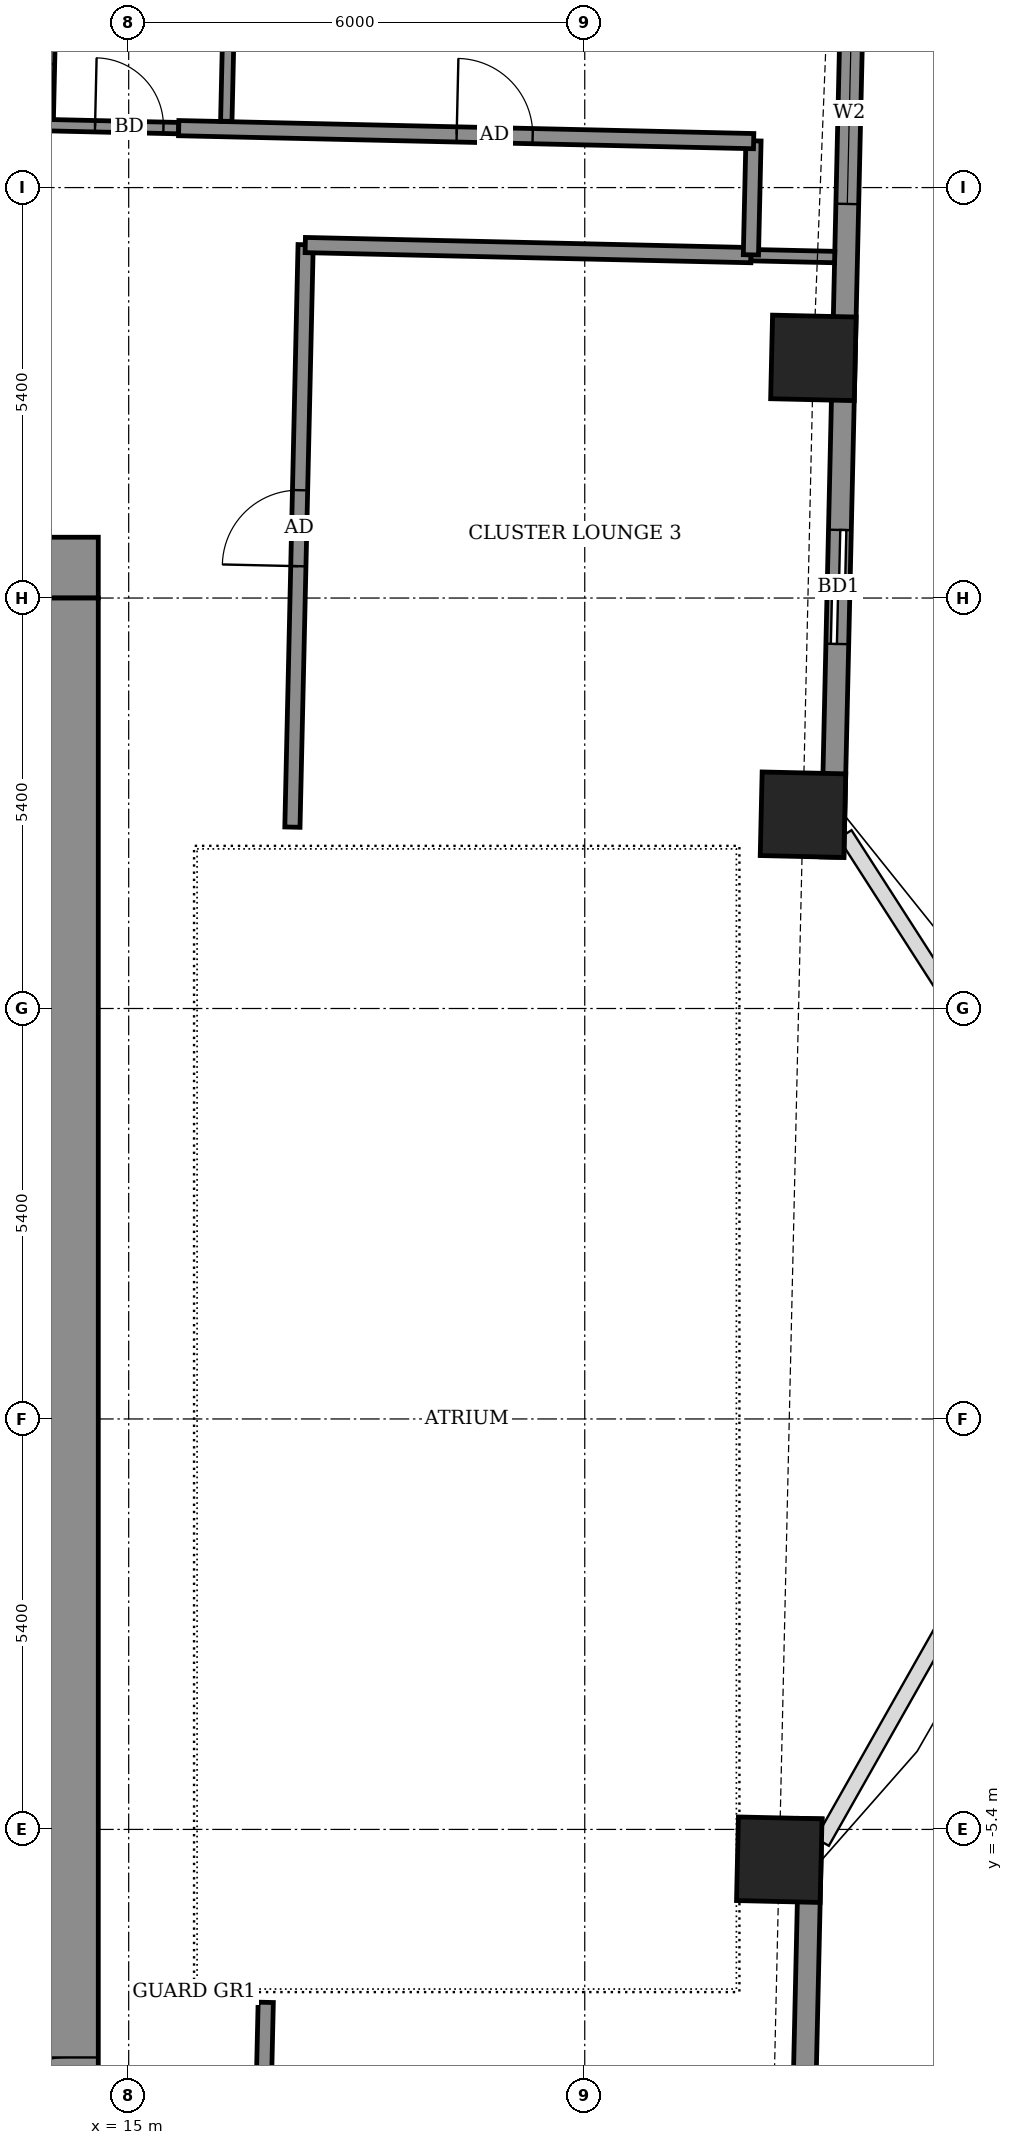
"""IFC4 building model, lengths in metres.
Left out: names, types, materials, properties, quantities, classifications, styles, units other than length and angle.
Written with IfcOpenShell. Run it as: python <this file> out.ifc"""

import sys

from ifc_helpers import new_model, si_unit, direction, frame, frame_2d, origin, origin_2d, place, context, subcontext, project, spatial, rectangle, extrude, element, fill, save


model = new_model("IFC4")
c1 = context("Model", 3, precision=1e-05, world=origin(), true_north=direction((0.0, 1.0)))
c2 = subcontext(c1, "Body", "Model", "MODEL_VIEW")
j1 = project(units=[si_unit("LENGTHUNIT", "METRE"), si_unit("PLANEANGLEUNIT", "RADIAN")], contexts=[c1])
p1 = place(None, origin())
s1 = spatial("IfcSite", under=j1, at=p1, CompositionType="ELEMENT")
p2 = place(p1, origin())
s2 = spatial("IfcBuilding", under=s1, at=p2, CompositionType="ELEMENT")
p3 = place(p2, frame((0.0, 0.0, 208.7)))
s3 = spatial("IfcBuildingStorey", under=s2, at=p3, CompositionType="ELEMENT", Elevation=208.7)
for number, where, z_axis, x_axis in (
    (1, (23.559, -5.799, -0.55), (0.0, 0.0, 1.0), (0.023, 1.0, 0.0)),
    (2, (23.871, 7.949, -0.55), (0.0, 0.0, 1.0), (0.023, 1.0, 0.0)),
    (3, (24.008, 13.959, -0.55), (0.0, 0.0, 1.0), (0.023, 1.0, 0.0)),
):
    element("IfcColumn", number, at=place(p3, frame(where, z_axis=z_axis, x_axis=x_axis)), inside=s3, PredefinedType="COLUMN", context=c2, shape_type="SweptSolid", body=[
        extrude(rectangle(XDim=1.1, YDim=1.1, at=origin_2d()), origin(), (0.0, 0.0, 1.0), 3.6),
    ])
p4 = place(p3, frame((23.713, -16.679, 0.0), z_axis=(0.0, 0.0, 1.0), x_axis=(0.022674801414, 0.999742893639, 0.0)))
e4 = element("IfcWall", 4, at=p4, inside=s3, PredefinedType="SOLIDWALL", context=c2, shape_type="SweptSolid", body=[
    extrude(rectangle(XDim=11.424, YDim=0.3, at=frame_2d((5.712, 0.0))), origin(), (0.0, 0.0, 1.0), 2.55),
])
p5 = place(p4, frame((1.428, 0.0, 0.0)))
e5 = element("IfcOpeningElement", 5, at=p5, cuts=e4, PredefinedType="OPENING", context=c2, shape_type="SweptSolid", body=[
    extrude(rectangle(XDim=1.5, YDim=2.4, at=frame_2d((0.75, 1.2))), frame((0.0, 0.16, 0.0), z_axis=(0.0, -1.0, 0.0), x_axis=(1.0, 0.0, 0.0)), (0.0, 0.0, 1.0), 0.32),
])
p6 = place(p4, frame((6.577, 0.0, 0.9)))
e6 = element("IfcOpeningElement", 6, at=p6, cuts=e4, PredefinedType="OPENING", context=c2, shape_type="SweptSolid", body=[
    extrude(rectangle(XDim=1.2, YDim=1.5, at=frame_2d((0.6, 0.75))), frame((0.0, 0.16, 0.0), z_axis=(0.0, -1.0, 0.0), x_axis=(1.0, 0.0, 0.0)), (0.0, 0.0, 1.0), 0.32),
])
p7 = place(p3, frame((24.259, 7.391, 0.0), z_axis=(0.0, 0.0, 1.0), x_axis=(0.022696408441, 0.999742403344, 0.0)))
e7 = element("IfcWall", 7, at=p7, inside=s3, PredefinedType="SOLIDWALL", context=c2, shape_type="SweptSolid", body=[
    extrude(rectangle(XDim=12.424, YDim=0.3, at=frame_2d((6.212, 0.0))), origin(), (0.0, 0.0, 1.0), 2.55),
])
p8 = place(p7, frame((2.806, 0.0, 0.0)))
e8 = element("IfcOpeningElement", 8, at=p8, cuts=e7, PredefinedType="OPENING", context=c2, shape_type="SweptSolid", body=[
    extrude(rectangle(XDim=1.5, YDim=2.4, at=frame_2d((0.75, 1.2))), frame((0.0, 0.16, 0.0), z_axis=(0.0, -1.0, 0.0), x_axis=(1.0, 0.0, 0.0)), (0.0, 0.0, 1.0), 0.32),
])
p9 = place(p7, frame((8.596, 0.0, 0.9)))
e9 = element("IfcOpeningElement", 9, at=p9, cuts=e7, PredefinedType="OPENING", context=c2, shape_type="SweptSolid", body=[
    extrude(rectangle(XDim=2.4, YDim=1.5, at=frame_2d((1.2, 0.75))), frame((0.0, 0.16, 0.0), z_axis=(0.0, -1.0, 0.0), x_axis=(1.0, 0.0, 0.0)), (0.0, 0.0, 1.0), 0.32),
])
p10 = place(p3, frame((16.684, -12.919, 0.0), z_axis=(0.0, 0.0, 1.0), x_axis=(0.022667483124, 0.999743059595, 0.0)))
e10 = element("IfcWall", 10, at=p10, inside=s3, PredefinedType="PARTITIONING", context=c2, shape_type="SweptSolid", body=[
    extrude(rectangle(XDim=5.245, YDim=0.2, at=frame_2d((2.623, 0.0))), origin(), (0.0, 0.0, 1.0), 3.05),
])
p11 = place(p3, frame((17.154, 7.786, 0.0), z_axis=(0.0, 0.0, 1.0), x_axis=(0.022680883318, 0.999742755679, 0.0)))
e11 = element("IfcWall", 11, at=p11, inside=s3, PredefinedType="PARTITIONING", context=c2, shape_type="SweptSolid", body=[
    extrude(rectangle(XDim=7.664, YDim=0.2, at=frame_2d((3.832, 0.0))), origin(), (0.0, 0.0, 1.0), 3.05),
])
p12 = place(p11, frame((3.434, 0.0, 0.0)))
e12 = element("IfcOpeningElement", 12, at=p12, cuts=e11, PredefinedType="OPENING", context=c2, shape_type="SweptSolid", body=[
    extrude(rectangle(XDim=1.0, YDim=2.1, at=frame_2d((0.5, 1.05))), frame((0.0, 0.11, 0.0), z_axis=(0.0, -1.0, 0.0), x_axis=(1.0, 0.0, 0.0)), (0.0, 0.0, 1.0), 0.22),
])
p13 = place(p3, frame((17.323, 15.444, 0.0), z_axis=(0.0, 0.0, 1.0), x_axis=(0.999742758565, -0.022680756085, 0.0)))
e13 = element("IfcWall", 13, at=p13, inside=s3, PredefinedType="PARTITIONING", context=c2, shape_type="SweptSolid", body=[
    extrude(rectangle(XDim=5.866, YDim=0.2, at=frame_2d((2.933, 0.0))), origin(), (0.0, 0.0, 1.0), 3.05),
])
p14 = place(p3, frame((23.188, 15.311, 0.0), z_axis=(0.0, 0.0, 1.0), x_axis=(0.999738848859, -0.022852441507, 0.0)))
e14 = element("IfcWall", 14, at=p14, inside=s3, PredefinedType="PARTITIONING", context=c2, shape_type="SweptSolid", body=[
    extrude(rectangle(XDim=1.1, YDim=0.15, at=frame_2d((0.55, 0.0))), origin(), (0.0, 0.0, 1.0), 2.55),
])
p15 = place(p3, frame((23.186, 15.315, 0.0), z_axis=(0.0, 0.0, 1.0), x_axis=(0.022617910375, 0.999744182344, 0.0)))
e15 = element("IfcWall", 15, at=p15, inside=s3, PredefinedType="PARTITIONING", context=c2, shape_type="SweptSolid", body=[
    extrude(rectangle(XDim=1.5, YDim=0.2, at=frame_2d((0.75, 0.0))), origin(), (0.0, 0.0, 1.0), 3.05),
])
p16 = place(p3, frame((-14.871, 17.675, 0.0), z_axis=(0.0, 0.0, 1.0), x_axis=(0.999742359486, -0.02269834024, 0.0)))
e16 = element("IfcWall", 16, at=p16, inside=s3, PredefinedType="PARTITIONING", context=c2, shape_type="SweptSolid", body=[
    extrude(rectangle(XDim=30.536, YDim=0.15, at=frame_2d((15.268, 0.0))), origin(), (0.0, 0.0, 1.0), 3.05),
])
p17 = place(p16, frame((29.436, 0.0, 0.0)))
e17 = element("IfcOpeningElement", 17, at=p17, cuts=e16, PredefinedType="OPENING", context=c2, shape_type="SweptSolid", body=[
    extrude(rectangle(XDim=0.9, YDim=2.1, at=frame_2d((0.45, 1.05))), frame((0.0, 0.085, 0.0), z_axis=(0.0, -1.0, 0.0), x_axis=(1.0, 0.0, 0.0)), (0.0, 0.0, 1.0), 0.17),
])
p18 = place(p16, frame((22.484, 0.0, 0.0)))
e18 = element("IfcOpeningElement", 18, at=p18, cuts=e16, PredefinedType="OPENING", context=c2, shape_type="SweptSolid", body=[
    extrude(rectangle(XDim=0.9, YDim=2.1, at=frame_2d((0.45, 1.05))), frame((0.0, 0.085, 0.0), z_axis=(0.0, -1.0, 0.0), x_axis=(1.0, 0.0, 0.0)), (0.0, 0.0, 1.0), 0.17),
])
p19 = place(p16, frame((20.434, 0.0, 0.0)))
e19 = element("IfcOpeningElement", 19, at=p19, cuts=e16, PredefinedType="OPENING", context=c2, shape_type="SweptSolid", body=[
    extrude(rectangle(XDim=0.9, YDim=2.1, at=frame_2d((0.45, 1.05))), frame((0.0, 0.085, 0.0), z_axis=(0.0, -1.0, 0.0), x_axis=(1.0, 0.0, 0.0)), (0.0, 0.0, 1.0), 0.17),
])
p20 = place(p16, frame((13.484, 0.0, 0.0)))
e20 = element("IfcOpeningElement", 20, at=p20, cuts=e16, PredefinedType="OPENING", context=c2, shape_type="SweptSolid", body=[
    extrude(rectangle(XDim=0.9, YDim=2.1, at=frame_2d((0.45, 1.05))), frame((0.0, 0.085, 0.0), z_axis=(0.0, -1.0, 0.0), x_axis=(1.0, 0.0, 0.0)), (0.0, 0.0, 1.0), 0.17),
])
p21 = place(p16, frame((11.334, 0.0, 0.0)))
e21 = element("IfcOpeningElement", 21, at=p21, cuts=e16, PredefinedType="OPENING", context=c2, shape_type="SweptSolid", body=[
    extrude(rectangle(XDim=0.9, YDim=2.1, at=frame_2d((0.45, 1.05))), frame((0.0, 0.085, 0.0), z_axis=(0.0, -1.0, 0.0), x_axis=(1.0, 0.0, 0.0)), (0.0, 0.0, 1.0), 0.17),
])
p22 = place(p16, frame((4.359, 0.0, 0.0)))
e22 = element("IfcOpeningElement", 22, at=p22, cuts=e16, PredefinedType="OPENING", context=c2, shape_type="SweptSolid", body=[
    extrude(rectangle(XDim=0.9, YDim=2.1, at=frame_2d((0.45, 1.05))), frame((0.0, 0.085, 0.0), z_axis=(0.0, -1.0, 0.0), x_axis=(1.0, 0.0, 0.0)), (0.0, 0.0, 1.0), 0.17),
])
p23 = place(p16, frame((2.009, 0.0, 0.0)))
e23 = element("IfcOpeningElement", 23, at=p23, cuts=e16, PredefinedType="OPENING", context=c2, shape_type="SweptSolid", body=[
    extrude(rectangle(XDim=0.9, YDim=2.1, at=frame_2d((0.45, 1.05))), frame((0.0, 0.085, 0.0), z_axis=(0.0, -1.0, 0.0), x_axis=(1.0, 0.0, 0.0)), (0.0, 0.0, 1.0), 0.17),
])
p24 = place(p3, frame((15.658, 16.982, 0.0), z_axis=(0.0, 0.0, 1.0), x_axis=(0.99974485859, -0.022587999516, 0.0)))
e24 = element("IfcWall", 24, at=p24, inside=s3, PredefinedType="PARTITIONING", context=c2, shape_type="SweptSolid", body=[
    extrude(rectangle(XDim=7.566, YDim=0.2, at=frame_2d((3.783, 0.0))), origin(), (0.0, 0.0, 1.0), 3.05),
])
p25 = place(p24, frame((3.658, 0.0, 0.0)))
e25 = element("IfcOpeningElement", 25, at=p25, cuts=e24, PredefinedType="OPENING", context=c2, shape_type="SweptSolid", body=[
    extrude(rectangle(XDim=1.0, YDim=2.1, at=frame_2d((0.5, 1.05))), frame((0.0, 0.11, 0.0), z_axis=(0.0, -1.0, 0.0), x_axis=(1.0, 0.0, 0.0)), (0.0, 0.0, 1.0), 0.22),
])
p26 = place(p3, frame((13.935, 17.101, 0.0), z_axis=(0.0, 0.0, 1.0), x_axis=(0.022370700241, 0.999749744571, 0.0)))
e26 = element("IfcWall", 26, at=p26, inside=s3, PredefinedType="PARTITIONING", context=c2, shape_type="SweptSolid", body=[
    extrude(rectangle(XDim=2.324, YDim=0.15, at=frame_2d((1.162, 0.0))), origin(), (0.0, 0.0, 1.0), 3.05),
])
p27 = place(p26, frame((0.725, 0.0, 0.0)))
e27 = element("IfcOpeningElement", 27, at=p27, cuts=e26, PredefinedType="OPENING", context=c2, shape_type="SweptSolid", body=[
    extrude(rectangle(XDim=0.8, YDim=2.1, at=frame_2d((0.4, 1.05))), frame((0.0, 0.085, 0.0), z_axis=(0.0, -1.0, 0.0), x_axis=(1.0, 0.0, 0.0)), (0.0, 0.0, 1.0), 0.17),
])
p28 = place(p3, frame((16.284, 17.072, 0.0), z_axis=(0.0, 0.0, 1.0), x_axis=(0.022815200701, 0.99973969943, 0.0)))
e28 = element("IfcWall", 28, at=p28, inside=s3, PredefinedType="PARTITIONING", context=c2, shape_type="SweptSolid", body=[
    extrude(rectangle(XDim=6.977, YDim=0.15, at=frame_2d((3.488, 0.0))), origin(), (0.0, 0.0, 1.0), 2.55),
])
p29 = place(p3, frame((-14.6, 11.2, 0.0), z_axis=(0.0, 0.0, 1.0), x_axis=(1.0, 0.0, 0.0)))
e29 = element("IfcWall", 29, at=p29, inside=s3, PredefinedType="SHEAR", context=c2, shape_type="SweptSolid", body=[
    extrude(rectangle(XDim=29.2, YDim=0.8, at=frame_2d((14.6, 0.0))), origin(), (0.0, 0.0, 1.0), 3.6),
])
p30 = place(p3, frame((14.2, -10.8, 0.0), z_axis=(0.0, 0.0, 1.0), x_axis=(0.0, 1.0, 0.0)))
e30 = element("IfcWall", 30, at=p30, inside=s3, PredefinedType="SHEAR", context=c2, shape_type="SweptSolid", body=[
    extrude(rectangle(XDim=21.6, YDim=0.8, at=frame_2d((10.8, 0.0))), origin(), (0.0, 0.0, 1.0), 3.6),
])
p31 = place(p30, frame((1.2, 0.0, 0.0)))
e31 = element("IfcOpeningElement", 31, at=p31, cuts=e30, PredefinedType="OPENING", context=c2, shape_type="SweptSolid", body=[
    extrude(rectangle(XDim=1.2, YDim=2.1, at=frame_2d((0.6, 1.05))), frame((0.0, 0.41, 0.0), z_axis=(0.0, -1.0, 0.0), x_axis=(1.0, 0.0, 0.0)), (0.0, 0.0, 1.0), 0.82),
])
p32 = place(p8, origin())
e32 = element("IfcDoor", 32, at=p32, inside=s3, OperationType="SLIDING_TO_LEFT", PredefinedType="DOOR", context=c2, shape_type="SweptSolid", body=[
    extrude(rectangle(XDim=1.5, YDim=2.4, at=frame_2d((0.75, 1.2))), frame((0.0, 0.025, 0.0), z_axis=(0.0, -1.0, 0.0), x_axis=(1.0, 0.0, 0.0)), (0.0, 0.0, 1.0), 0.05),
])
fill(e8, e32)
p33 = place(p9, origin())
e33 = element("IfcWindow", 33, at=p33, inside=s3, PartitioningType="DOUBLE_PANEL_VERTICAL", PredefinedType="WINDOW", context=c2, shape_type="SweptSolid", body=[
    extrude(rectangle(XDim=2.4, YDim=1.5, at=frame_2d((1.2, 0.75))), frame((0.0, 0.03, 0.0), z_axis=(0.0, -1.0, 0.0), x_axis=(1.0, 0.0, 0.0)), (0.0, 0.0, 1.0), 0.06),
])
fill(e9, e33)
p34 = place(p12, origin())
e34 = element("IfcDoor", 34, at=p34, inside=s3, OperationType="SINGLE_SWING_RIGHT", PredefinedType="DOOR", context=c2, shape_type="SweptSolid", body=[
    extrude(rectangle(XDim=1.0, YDim=2.1, at=frame_2d((0.5, 1.05))), frame((0.0, 0.025, 0.0), z_axis=(0.0, -1.0, 0.0), x_axis=(1.0, 0.0, 0.0)), (0.0, 0.0, 1.0), 0.05),
])
fill(e12, e34)
p35 = place(p25, origin())
e35 = element("IfcDoor", 35, at=p35, inside=s3, OperationType="SINGLE_SWING_LEFT", PredefinedType="DOOR", context=c2, shape_type="SweptSolid", body=[
    extrude(rectangle(XDim=1.0, YDim=2.1, at=frame_2d((0.5, 1.05))), frame((0.0, 0.025, 0.0), z_axis=(0.0, -1.0, 0.0), x_axis=(1.0, 0.0, 0.0)), (0.0, 0.0, 1.0), 0.05),
])
fill(e25, e35)
p36 = place(p17, origin())
e36 = element("IfcDoor", 36, at=p36, inside=s3, OperationType="SINGLE_SWING_RIGHT", PredefinedType="DOOR", context=c2, shape_type="SweptSolid", body=[
    extrude(rectangle(XDim=0.9, YDim=2.1, at=frame_2d((0.45, 1.05))), frame((0.0, 0.025, 0.0), z_axis=(0.0, -1.0, 0.0), x_axis=(1.0, 0.0, 0.0)), (0.0, 0.0, 1.0), 0.05),
])
fill(e17, e36)
p37 = place(p31, origin())
e37 = element("IfcDoor", 37, at=p37, inside=s3, OperationType="DOUBLE_DOOR_SINGLE_SWING", PredefinedType="DOOR", context=c2, shape_type="SweptSolid", body=[
    extrude(rectangle(XDim=1.2, YDim=2.1, at=frame_2d((0.6, 1.05))), frame((0.0, 0.025, 0.0), z_axis=(0.0, -1.0, 0.0), x_axis=(1.0, 0.0, 0.0)), (0.0, 0.0, 1.0), 0.05),
])
fill(e31, e37)
save(model, sys.argv[1])
